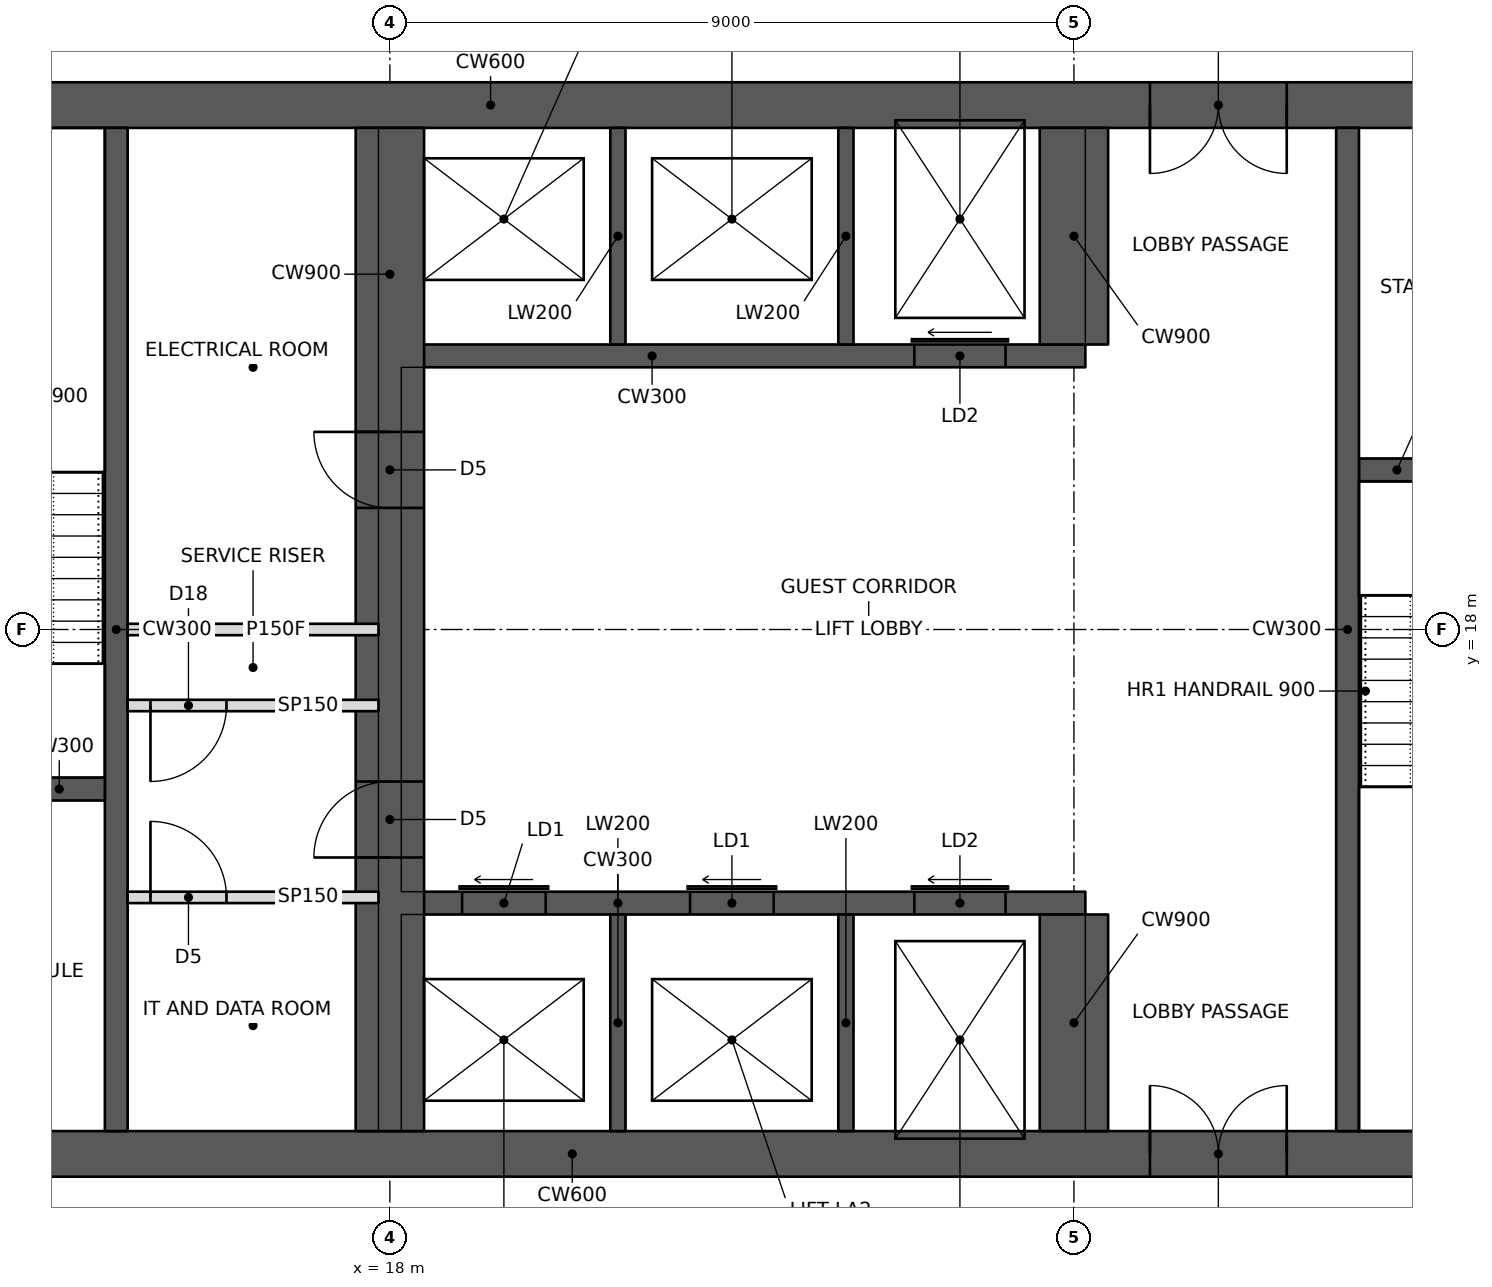
"""IFC4 building model, lengths in metres.
Left out: names, types, materials, properties, quantities, classifications, styles, units other than length and angle.
Written with IfcOpenShell. Run it as: python <this file> out.ifc"""

import sys

from ifc_helpers import new_model, si_unit, direction, frame, frame_2d, origin, place, context, subcontext, project, spatial, rectangle, extrude, element, fill, save


model = new_model("IFC4")
c1 = context("Model", 3, precision=1e-05, world=origin(), true_north=direction((0.0, 1.0)))
c2 = subcontext(c1, "Body", "Model", "MODEL_VIEW")
j1 = project(units=[si_unit("LENGTHUNIT", "METRE"), si_unit("PLANEANGLEUNIT", "RADIAN")], contexts=[c1])
p1 = place(None, origin())
s1 = spatial("IfcSite", under=j1, at=p1, CompositionType="ELEMENT")
p2 = place(p1, origin())
s2 = spatial("IfcBuilding", under=s1, at=p2, CompositionType="ELEMENT")
p3 = place(p2, frame((0.0, 0.0, 85.8)))
s3 = spatial("IfcBuildingStorey", under=s2, at=p3, CompositionType="ELEMENT", Elevation=85.8)
p4 = place(p3, frame((10.8, 11.1, 0.0), z_axis=(0.0, 0.0, 1.0), x_axis=(1.0, 0.0, 0.0)))
e1 = element("IfcWall", 1, at=p4, inside=s3, PredefinedType="SHEAR", context=c2, shape_type="SweptSolid", body=[
    extrude(rectangle(XDim=23.4, YDim=0.6, at=frame_2d((11.7, 0.0))), origin(), (0.0, 0.0, 1.0), 3.4),
])
p5 = place(p4, frame((1.0, 0.0, 0.0)))
e2 = element("IfcOpeningElement", 2, at=p5, cuts=e1, PredefinedType="OPENING", context=c2, shape_type="SweptSolid", body=[
    extrude(rectangle(XDim=1.0, YDim=2.1, at=frame_2d((0.5, 1.05))), frame((0.0, 0.31, 0.0), z_axis=(0.0, -1.0, 0.0), x_axis=(1.0, 0.0, 0.0)), (0.0, 0.0, 1.0), 0.62),
])
p6 = place(p4, frame((17.2, 0.0, 0.0)))
e3 = element("IfcOpeningElement", 3, at=p6, cuts=e1, PredefinedType="OPENING", context=c2, shape_type="SweptSolid", body=[
    extrude(rectangle(XDim=1.8, YDim=2.1, at=frame_2d((0.9, 1.05))), frame((0.0, 0.31, 0.0), z_axis=(0.0, -1.0, 0.0), x_axis=(1.0, 0.0, 0.0)), (0.0, 0.0, 1.0), 0.62),
])
p7 = place(p3, frame((10.8, 24.9, 0.0), z_axis=(0.0, 0.0, 1.0), x_axis=(1.0, 0.0, 0.0)))
e4 = element("IfcWall", 4, at=p7, inside=s3, PredefinedType="SHEAR", context=c2, shape_type="SweptSolid", body=[
    extrude(rectangle(XDim=23.4, YDim=0.6, at=frame_2d((11.7, 0.0))), origin(), (0.0, 0.0, 1.0), 3.4),
])
p8 = place(p7, frame((17.2, 0.0, 0.0)))
e5 = element("IfcOpeningElement", 5, at=p8, cuts=e4, PredefinedType="OPENING", context=c2, shape_type="SweptSolid", body=[
    extrude(rectangle(XDim=1.8, YDim=2.1, at=frame_2d((0.9, 1.05))), frame((0.0, 0.31, 0.0), z_axis=(0.0, -1.0, 0.0), x_axis=(1.0, 0.0, 0.0)), (0.0, 0.0, 1.0), 0.62),
])
p9 = place(p7, frame((21.1, 0.0, 0.0)))
e6 = element("IfcOpeningElement", 6, at=p9, cuts=e4, PredefinedType="OPENING", context=c2, shape_type="SweptSolid", body=[
    extrude(rectangle(XDim=1.0, YDim=2.1, at=frame_2d((0.5, 1.05))), frame((0.0, 0.31, 0.0), z_axis=(0.0, -1.0, 0.0), x_axis=(1.0, 0.0, 0.0)), (0.0, 0.0, 1.0), 0.62),
])
p10 = place(p3, frame((14.4, 11.4, 0.0), z_axis=(0.0, 0.0, 1.0), x_axis=(0.0, 1.0, 0.0)))
e7 = element("IfcWall", 7, at=p10, inside=s3, PredefinedType="SHEAR", context=c2, shape_type="SweptSolid", body=[
    extrude(rectangle(XDim=13.2, YDim=0.3, at=frame_2d((6.6, 0.0))), origin(), (0.0, 0.0, 1.0), 3.4),
])
p11 = place(p3, frame((11.4, 15.9, 0.0), z_axis=(0.0, 0.0, 1.0), x_axis=(1.0, 0.0, 0.0)))
e8 = element("IfcWall", 8, at=p11, inside=s3, PredefinedType="SHEAR", context=c2, shape_type="SweptSolid", body=[
    extrude(rectangle(XDim=2.85, YDim=0.3, at=frame_2d((1.425, 0.0))), origin(), (0.0, 0.0, 1.0), 3.4),
])
p12 = place(p11, frame((0.5, 0.0, 0.0)))
e9 = element("IfcOpeningElement", 9, at=p12, cuts=e8, PredefinedType="OPENING", context=c2, shape_type="SweptSolid", body=[
    extrude(rectangle(XDim=1.0, YDim=2.1, at=frame_2d((0.5, 1.05))), frame((0.0, 0.16, 0.0), z_axis=(0.0, -1.0, 0.0), x_axis=(1.0, 0.0, 0.0)), (0.0, 0.0, 1.0), 0.32),
])
p13 = place(p3, frame((18.0, 11.4, 0.0), z_axis=(0.0, 0.0, 1.0), x_axis=(0.0, 1.0, 0.0)))
e10 = element("IfcWall", 10, at=p13, inside=s3, PredefinedType="SHEAR", context=c2, shape_type="SweptSolid", body=[
    extrude(rectangle(XDim=13.2, YDim=0.9, at=frame_2d((6.6, 0.0))), origin(), (0.0, 0.0, 1.0), 3.4),
])
p14 = place(p13, frame((3.6, 0.0, 0.0)))
e11 = element("IfcOpeningElement", 11, at=p14, cuts=e10, PredefinedType="OPENING", context=c2, shape_type="SweptSolid", body=[
    extrude(rectangle(XDim=1.0, YDim=2.1, at=frame_2d((0.5, 1.05))), frame((0.0, 0.46, 0.0), z_axis=(0.0, -1.0, 0.0), x_axis=(1.0, 0.0, 0.0)), (0.0, 0.0, 1.0), 0.92),
])
p15 = place(p13, frame((8.2, 0.0, 0.0)))
e12 = element("IfcOpeningElement", 12, at=p15, cuts=e10, PredefinedType="OPENING", context=c2, shape_type="SweptSolid", body=[
    extrude(rectangle(XDim=1.0, YDim=2.1, at=frame_2d((0.5, 1.05))), frame((0.0, 0.46, 0.0), z_axis=(0.0, -1.0, 0.0), x_axis=(1.0, 0.0, 0.0)), (0.0, 0.0, 1.0), 0.92),
])
p16 = place(p3, frame((14.55, 18.0, 0.0), z_axis=(0.0, 0.0, 1.0), x_axis=(1.0, 0.0, 0.0)))
e13 = element("IfcWall", 13, at=p16, inside=s3, PredefinedType="PARTITIONING", context=c2, shape_type="SweptSolid", body=[
    extrude(rectangle(XDim=3.3, YDim=0.15, at=frame_2d((1.65, 0.0))), origin(), (0.0, 0.0, 1.0), 3.15),
])
p17 = place(p3, frame((18.15, 14.4, 0.0), z_axis=(0.0, 0.0, 1.0), x_axis=(1.0, 0.0, 0.0)))
e14 = element("IfcWall", 14, at=p17, inside=s3, PredefinedType="SHEAR", context=c2, shape_type="SweptSolid", body=[
    extrude(rectangle(XDim=9.0, YDim=0.3, at=frame_2d((4.5, 0.0))), origin(), (0.0, 0.0, 1.0), 3.4),
])
p18 = place(p17, frame((0.8, 0.0, 0.0)))
e15 = element("IfcOpeningElement", 15, at=p18, cuts=e14, PredefinedType="OPENING", context=c2, shape_type="SweptSolid", body=[
    extrude(rectangle(XDim=1.1, YDim=2.1, at=frame_2d((0.55, 1.05))), frame((0.0, 0.16, 0.0), z_axis=(0.0, -1.0, 0.0), x_axis=(1.0, 0.0, 0.0)), (0.0, 0.0, 1.0), 0.32),
])
p19 = place(p17, frame((3.8, 0.0, 0.0)))
e16 = element("IfcOpeningElement", 16, at=p19, cuts=e14, PredefinedType="OPENING", context=c2, shape_type="SweptSolid", body=[
    extrude(rectangle(XDim=1.1, YDim=2.1, at=frame_2d((0.55, 1.05))), frame((0.0, 0.16, 0.0), z_axis=(0.0, -1.0, 0.0), x_axis=(1.0, 0.0, 0.0)), (0.0, 0.0, 1.0), 0.32),
])
p20 = place(p17, frame((6.75, 0.0, 0.0)))
e17 = element("IfcOpeningElement", 17, at=p20, cuts=e14, PredefinedType="OPENING", context=c2, shape_type="SweptSolid", body=[
    extrude(rectangle(XDim=1.2, YDim=2.1, at=frame_2d((0.6, 1.05))), frame((0.0, 0.16, 0.0), z_axis=(0.0, -1.0, 0.0), x_axis=(1.0, 0.0, 0.0)), (0.0, 0.0, 1.0), 0.32),
])
p21 = place(p3, frame((27.0, 11.4, 0.0), z_axis=(0.0, 0.0, 1.0), x_axis=(0.0, 1.0, 0.0)))
e18 = element("IfcWall", 18, at=p21, inside=s3, PredefinedType="SHEAR", context=c2, shape_type="SweptSolid", body=[
    extrude(rectangle(XDim=2.85, YDim=0.9, at=frame_2d((1.425, 0.0))), origin(), (0.0, 0.0, 1.0), 3.4),
])
for number, where, z_axis, x_axis in (
    (19, (21.0, 11.4, 0.0), (0.0, 0.0, 1.0), (0.0, 1.0, 0.0)),
    (20, (24.0, 11.4, 0.0), (0.0, 0.0, 1.0), (0.0, 1.0, 0.0)),
):
    element("IfcWall", number, at=place(p3, frame(where, z_axis=z_axis, x_axis=x_axis)), inside=s3, PredefinedType="SHEAR", context=c2, shape_type="SweptSolid", body=[
        extrude(rectangle(XDim=2.85, YDim=0.2, at=frame_2d((1.425, 0.0))), origin(), (0.0, 0.0, 1.0), 3.4),
    ])
p22 = place(p3, frame((18.15, 21.6, 0.0), z_axis=(0.0, 0.0, 1.0), x_axis=(1.0, 0.0, 0.0)))
e21 = element("IfcWall", 21, at=p22, inside=s3, PredefinedType="SHEAR", context=c2, shape_type="SweptSolid", body=[
    extrude(rectangle(XDim=9.0, YDim=0.3, at=frame_2d((4.5, 0.0))), origin(), (0.0, 0.0, 1.0), 3.4),
])
p23 = place(p22, frame((6.75, 0.0, 0.0)))
e22 = element("IfcOpeningElement", 22, at=p23, cuts=e21, PredefinedType="OPENING", context=c2, shape_type="SweptSolid", body=[
    extrude(rectangle(XDim=1.2, YDim=2.1, at=frame_2d((0.6, 1.05))), frame((0.0, 0.16, 0.0), z_axis=(0.0, -1.0, 0.0), x_axis=(1.0, 0.0, 0.0)), (0.0, 0.0, 1.0), 0.32),
])
p24 = place(p3, frame((27.0, 21.75, 0.0), z_axis=(0.0, 0.0, 1.0), x_axis=(0.0, 1.0, 0.0)))
e23 = element("IfcWall", 23, at=p24, inside=s3, PredefinedType="SHEAR", context=c2, shape_type="SweptSolid", body=[
    extrude(rectangle(XDim=2.85, YDim=0.9, at=frame_2d((1.425, 0.0))), origin(), (0.0, 0.0, 1.0), 3.4),
])
for number, where, z_axis, x_axis in (
    (24, (21.0, 21.75, 0.0), (0.0, 0.0, 1.0), (0.0, 1.0, 0.0)),
    (25, (24.0, 21.75, 0.0), (0.0, 0.0, 1.0), (0.0, 1.0, 0.0)),
):
    element("IfcWall", number, at=place(p3, frame(where, z_axis=z_axis, x_axis=x_axis)), inside=s3, PredefinedType="SHEAR", context=c2, shape_type="SweptSolid", body=[
        extrude(rectangle(XDim=2.85, YDim=0.2, at=frame_2d((1.425, 0.0))), origin(), (0.0, 0.0, 1.0), 3.4),
    ])
p25 = place(p3, frame((30.6, 11.4, 0.0), z_axis=(0.0, 0.0, 1.0), x_axis=(0.0, 1.0, 0.0)))
e26 = element("IfcWall", 26, at=p25, inside=s3, PredefinedType="SHEAR", context=c2, shape_type="SweptSolid", body=[
    extrude(rectangle(XDim=13.2, YDim=0.3, at=frame_2d((6.6, 0.0))), origin(), (0.0, 0.0, 1.0), 3.4),
])
p26 = place(p3, frame((30.75, 20.1, 0.0), z_axis=(0.0, 0.0, 1.0), x_axis=(1.0, 0.0, 0.0)))
e27 = element("IfcWall", 27, at=p26, inside=s3, PredefinedType="SHEAR", context=c2, shape_type="SweptSolid", body=[
    extrude(rectangle(XDim=2.85, YDim=0.3, at=frame_2d((1.425, 0.0))), origin(), (0.0, 0.0, 1.0), 3.4),
])
p27 = place(p26, frame((1.15, 0.0, 0.0)))
e28 = element("IfcOpeningElement", 28, at=p27, cuts=e27, PredefinedType="OPENING", context=c2, shape_type="SweptSolid", body=[
    extrude(rectangle(XDim=1.0, YDim=2.1, at=frame_2d((0.5, 1.05))), frame((0.0, 0.16, 0.0), z_axis=(0.0, -1.0, 0.0), x_axis=(1.0, 0.0, 0.0)), (0.0, 0.0, 1.0), 0.32),
])
p28 = place(p3, frame((14.55, 17.0, 0.0), z_axis=(0.0, 0.0, 1.0), x_axis=(1.0, 0.0, 0.0)))
e29 = element("IfcWall", 29, at=p28, inside=s3, PredefinedType="PARTITIONING", context=c2, shape_type="SweptSolid", body=[
    extrude(rectangle(XDim=3.3, YDim=0.15, at=frame_2d((1.65, 0.0))), origin(), (0.0, 0.0, 1.0), 3.15),
])
p29 = place(p28, frame((0.3, 0.0, 0.0)))
e30 = element("IfcOpeningElement", 30, at=p29, cuts=e29, PredefinedType="OPENING", context=c2, shape_type="SweptSolid", body=[
    extrude(rectangle(XDim=1.0, YDim=2.1, at=frame_2d((0.5, 1.05))), frame((0.0, 0.085, 0.0), z_axis=(0.0, -1.0, 0.0), x_axis=(1.0, 0.0, 0.0)), (0.0, 0.0, 1.0), 0.17),
])
p30 = place(p3, frame((14.55, 14.475, 0.0), z_axis=(0.0, 0.0, 1.0), x_axis=(1.0, 0.0, 0.0)))
e31 = element("IfcWall", 31, at=p30, inside=s3, PredefinedType="PARTITIONING", context=c2, shape_type="SweptSolid", body=[
    extrude(rectangle(XDim=3.3, YDim=0.15, at=frame_2d((1.65, 0.0))), origin(), (0.0, 0.0, 1.0), 3.15),
])
p31 = place(p30, frame((0.3, 0.0, 0.0)))
e32 = element("IfcOpeningElement", 32, at=p31, cuts=e31, PredefinedType="OPENING", context=c2, shape_type="SweptSolid", body=[
    extrude(rectangle(XDim=1.0, YDim=2.1, at=frame_2d((0.5, 1.05))), frame((0.0, 0.085, 0.0), z_axis=(0.0, -1.0, 0.0), x_axis=(1.0, 0.0, 0.0)), (0.0, 0.0, 1.0), 0.17),
])
p32 = place(p29, frame((1.0, 0.0, 0.0), z_axis=(0.0, 0.0, 1.0), x_axis=(-1.0, 0.0, 0.0)))
e33 = element("IfcDoor", 33, at=p32, inside=s3, OperationType="SINGLE_SWING_RIGHT", PredefinedType="DOOR", context=c2, shape_type="SweptSolid", body=[
    extrude(rectangle(XDim=1.0, YDim=2.1, at=frame_2d((0.5, 1.05))), frame((0.0, 0.025, 0.0), z_axis=(0.0, -1.0, 0.0), x_axis=(1.0, 0.0, 0.0)), (0.0, 0.0, 1.0), 0.05),
])
fill(e30, e33)
p33 = place(p31, origin())
e34 = element("IfcDoor", 34, at=p33, inside=s3, OperationType="SINGLE_SWING_LEFT", PredefinedType="DOOR", context=c2, shape_type="SweptSolid", body=[
    extrude(rectangle(XDim=1.0, YDim=2.1, at=frame_2d((0.5, 1.05))), frame((0.0, 0.025, 0.0), z_axis=(0.0, -1.0, 0.0), x_axis=(1.0, 0.0, 0.0)), (0.0, 0.0, 1.0), 0.05),
])
fill(e32, e34)
p34 = place(p6, origin())
e35 = element("IfcDoor", 35, at=p34, inside=s3, OperationType="DOUBLE_DOOR_SINGLE_SWING", PredefinedType="DOOR", context=c2, shape_type="SweptSolid", body=[
    extrude(rectangle(XDim=1.8, YDim=2.1, at=frame_2d((0.9, 1.05))), frame((0.0, 0.025, 0.0), z_axis=(0.0, -1.0, 0.0), x_axis=(1.0, 0.0, 0.0)), (0.0, 0.0, 1.0), 0.05),
])
fill(e3, e35)
p35 = place(p8, frame((1.8, 0.0, 0.0), z_axis=(0.0, 0.0, 1.0), x_axis=(-1.0, 0.0, 0.0)))
e36 = element("IfcDoor", 36, at=p35, inside=s3, OperationType="DOUBLE_DOOR_SINGLE_SWING", PredefinedType="DOOR", context=c2, shape_type="SweptSolid", body=[
    extrude(rectangle(XDim=1.8, YDim=2.1, at=frame_2d((0.9, 1.05))), frame((0.0, 0.025, 0.0), z_axis=(0.0, -1.0, 0.0), x_axis=(1.0, 0.0, 0.0)), (0.0, 0.0, 1.0), 0.05),
])
fill(e5, e36)
p36 = place(p14, origin())
e37 = element("IfcDoor", 37, at=p36, inside=s3, OperationType="SINGLE_SWING_LEFT", PredefinedType="DOOR", context=c2, shape_type="SweptSolid", body=[
    extrude(rectangle(XDim=1.0, YDim=2.1, at=frame_2d((0.5, 1.05))), frame((0.0, 0.025, 0.0), z_axis=(0.0, -1.0, 0.0), x_axis=(1.0, 0.0, 0.0)), (0.0, 0.0, 1.0), 0.05),
])
fill(e11, e37)
p37 = place(p15, origin())
e38 = element("IfcDoor", 38, at=p37, inside=s3, OperationType="SINGLE_SWING_RIGHT", PredefinedType="DOOR", context=c2, shape_type="SweptSolid", body=[
    extrude(rectangle(XDim=1.0, YDim=2.1, at=frame_2d((0.5, 1.05))), frame((0.0, 0.025, 0.0), z_axis=(0.0, -1.0, 0.0), x_axis=(1.0, 0.0, 0.0)), (0.0, 0.0, 1.0), 0.05),
])
fill(e12, e38)
p38 = place(p18, origin())
e39 = element("IfcDoor", 39, at=p38, inside=s3, OperationType="SLIDING_TO_LEFT", PredefinedType="DOOR", context=c2, shape_type="SweptSolid", body=[
    extrude(rectangle(XDim=1.1, YDim=2.1, at=frame_2d((0.55, 1.05))), frame((0.0, 0.025, 0.0), z_axis=(0.0, -1.0, 0.0), x_axis=(1.0, 0.0, 0.0)), (0.0, 0.0, 1.0), 0.05),
])
fill(e15, e39)
p39 = place(p19, origin())
e40 = element("IfcDoor", 40, at=p39, inside=s3, OperationType="SLIDING_TO_LEFT", PredefinedType="DOOR", context=c2, shape_type="SweptSolid", body=[
    extrude(rectangle(XDim=1.1, YDim=2.1, at=frame_2d((0.55, 1.05))), frame((0.0, 0.025, 0.0), z_axis=(0.0, -1.0, 0.0), x_axis=(1.0, 0.0, 0.0)), (0.0, 0.0, 1.0), 0.05),
])
fill(e16, e40)
p40 = place(p20, origin())
e41 = element("IfcDoor", 41, at=p40, inside=s3, OperationType="SLIDING_TO_LEFT", PredefinedType="DOOR", context=c2, shape_type="SweptSolid", body=[
    extrude(rectangle(XDim=1.2, YDim=2.1, at=frame_2d((0.6, 1.05))), frame((0.0, 0.025, 0.0), z_axis=(0.0, -1.0, 0.0), x_axis=(1.0, 0.0, 0.0)), (0.0, 0.0, 1.0), 0.05),
])
fill(e17, e41)
p41 = place(p23, origin())
e42 = element("IfcDoor", 42, at=p41, inside=s3, OperationType="SLIDING_TO_LEFT", PredefinedType="DOOR", context=c2, shape_type="SweptSolid", body=[
    extrude(rectangle(XDim=1.2, YDim=2.1, at=frame_2d((0.6, 1.05))), frame((0.0, 0.025, 0.0), z_axis=(0.0, -1.0, 0.0), x_axis=(1.0, 0.0, 0.0)), (0.0, 0.0, 1.0), 0.05),
])
fill(e22, e42)
save(model, sys.argv[1])
